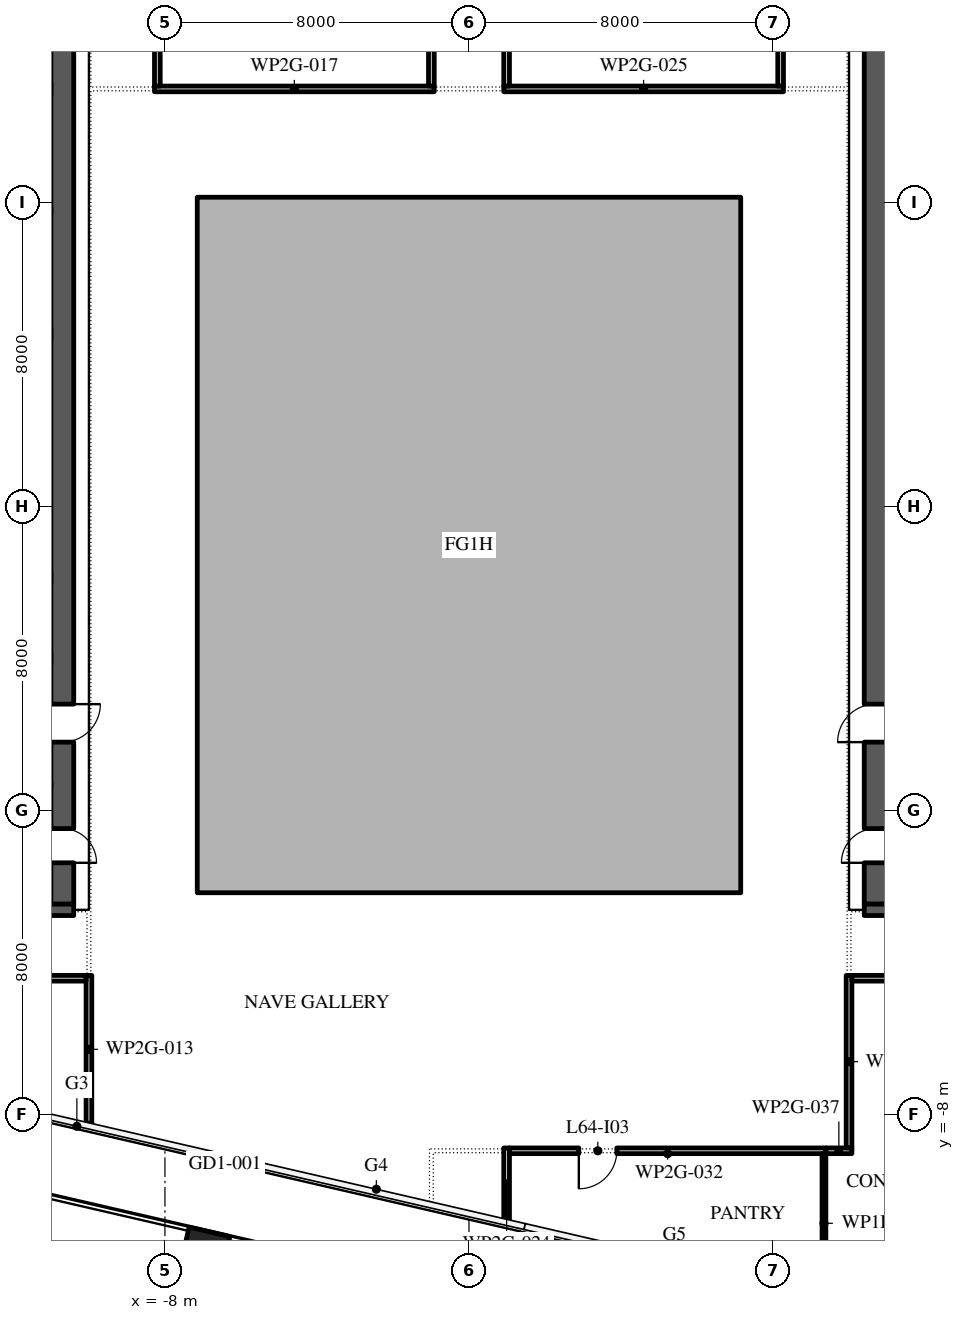
"""IFC4 building model, lengths in metres.
Left out: names, types, materials, properties, quantities, classifications, styles, units other than length and angle.
Written with IfcOpenShell. Run it as: python <this file> out.ifc"""

import sys

from ifc_helpers import new_model, si_unit, direction, frame, frame_2d, origin, origin_2d, place, context, subcontext, project, spatial, polyline, rectangle, outline, extrude, element, fill, save


model = new_model("IFC4")
c1 = context("Model", 3, precision=1e-05, world=origin(), true_north=direction((0.0, 1.0)))
c2 = subcontext(c1, "Body", "Model", "MODEL_VIEW")
j1 = project(units=[si_unit("LENGTHUNIT", "METRE"), si_unit("PLANEANGLEUNIT", "RADIAN")], contexts=[c1])
p1 = place(None, origin())
s1 = spatial("IfcSite", under=j1, at=p1, CompositionType="ELEMENT")
p2 = place(p1, origin())
s2 = spatial("IfcBuilding", under=s1, at=p2, CompositionType="ELEMENT")
p3 = place(p2, frame((0.0, 0.0, 293.4)))
s3 = spatial("IfcBuildingStorey", under=s2, at=p3, CompositionType="ELEMENT", Elevation=293.4)
p4 = place(p3, frame((-6.951, -11.608, 0.0), z_axis=(0.0, 0.0, 1.0), x_axis=(0.974370064785, -0.224951054344, 0.0)))
e1 = element("IfcColumn", 1, at=p4, inside=s3, PredefinedType="COLUMN", context=c2, shape_type="SweptSolid", body=[
    extrude(rectangle(XDim=1.1, YDim=1.1, at=origin_2d()), origin(), (0.0, 0.0, 1.0), 4.2),
])
p5 = place(p3, origin())
e2 = element("IfcWall", 2, at=p5, inside=s3, PredefinedType="STANDARD", context=c2, shape_type="SweptSolid", body=[
    extrude(outline(polyline([(-7.15, -2.15), (7.15, -2.15), (7.15, 16.15), (-7.15, 16.15), (-7.15, -2.15)]), holes=[polyline([(-7.0, -2.0), (-7.0, 16.0), (7.0, 16.0), (7.0, -2.0), (-7.0, -2.0)])]), origin(), (0.0, 0.0, 1.0), 3.75),
])
p6 = place(p3, frame((-10.7, -2.45, 0.0), z_axis=(0.0, 0.0, 1.0), x_axis=(0.0, 1.0, 0.0)))
e3 = element("IfcWall", 3, at=p6, inside=s3, PredefinedType="SHEAR", context=c2, shape_type="SweptSolid", body=[
    extrude(rectangle(XDim=27.9, YDim=0.6, at=frame_2d((13.95, 0.0))), origin(), (0.0, 0.0, 1.0), 3.75),
])
p7 = place(p6, frame((23.65, 0.0, 0.0)))
e4 = element("IfcOpeningElement", 4, at=p7, cuts=e3, PredefinedType="OPENING", context=c2, shape_type="SweptSolid", body=[
    extrude(rectangle(XDim=2.4, YDim=2.1, at=frame_2d((1.2, 1.05))), frame((0.0, 0.31, 0.0), z_axis=(0.0, -1.0, 0.0), x_axis=(1.0, 0.0, 0.0)), (0.0, 0.0, 1.0), 0.62),
])
p8 = place(p6, frame((1.087, 0.0, 0.0)))
e5 = element("IfcOpeningElement", 5, at=p8, cuts=e3, PredefinedType="OPENING", context=c2, shape_type="SweptSolid", body=[
    extrude(rectangle(XDim=0.9, YDim=2.1, at=frame_2d((0.45, 1.05))), frame((0.0, 0.31, 0.0), z_axis=(0.0, -1.0, 0.0), x_axis=(1.0, 0.0, 0.0)), (0.0, 0.0, 1.0), 0.62),
])
p9 = place(p6, frame((4.262, 0.0, 0.0)))
e6 = element("IfcOpeningElement", 6, at=p9, cuts=e3, PredefinedType="OPENING", context=c2, shape_type="SweptSolid", body=[
    extrude(rectangle(XDim=1.0, YDim=2.1, at=frame_2d((0.5, 1.05))), frame((0.0, 0.31, 0.0), z_axis=(0.0, -1.0, 0.0), x_axis=(1.0, 0.0, 0.0)), (0.0, 0.0, 1.0), 0.62),
])
p10 = place(p3, frame((-21.6, -2.6, 0.0), z_axis=(0.0, 0.0, 1.0), x_axis=(1.0, 0.0, 0.0)))
e7 = element("IfcWall", 7, at=p10, inside=s3, PredefinedType="SHEAR", context=c2, shape_type="SweptSolid", body=[
    extrude(rectangle(XDim=11.2, YDim=0.3, at=frame_2d((5.6, 0.0))), origin(), (0.0, 0.0, 1.0), 3.75),
])
p11 = place(p3, frame((10.7, -2.45, 0.0), z_axis=(0.0, 0.0, 1.0), x_axis=(0.0, 1.0, 0.0)))
e8 = element("IfcWall", 8, at=p11, inside=s3, PredefinedType="SHEAR", context=c2, shape_type="SweptSolid", body=[
    extrude(rectangle(XDim=27.9, YDim=0.6, at=frame_2d((13.95, 0.0))), origin(), (0.0, 0.0, 1.0), 3.75),
])
p12 = place(p11, frame((23.65, 0.0, 0.0)))
e9 = element("IfcOpeningElement", 9, at=p12, cuts=e8, PredefinedType="OPENING", context=c2, shape_type="SweptSolid", body=[
    extrude(rectangle(XDim=2.4, YDim=2.1, at=frame_2d((1.2, 1.05))), frame((0.0, 0.31, 0.0), z_axis=(0.0, -1.0, 0.0), x_axis=(1.0, 0.0, 0.0)), (0.0, 0.0, 1.0), 0.62),
])
p13 = place(p11, frame((1.087, 0.0, 0.0)))
e10 = element("IfcOpeningElement", 10, at=p13, cuts=e8, PredefinedType="OPENING", context=c2, shape_type="SweptSolid", body=[
    extrude(rectangle(XDim=0.9, YDim=2.1, at=frame_2d((0.45, 1.05))), frame((0.0, 0.31, 0.0), z_axis=(0.0, -1.0, 0.0), x_axis=(1.0, 0.0, 0.0)), (0.0, 0.0, 1.0), 0.62),
])
p14 = place(p11, frame((4.262, 0.0, 0.0)))
e11 = element("IfcOpeningElement", 11, at=p14, cuts=e8, PredefinedType="OPENING", context=c2, shape_type="SweptSolid", body=[
    extrude(rectangle(XDim=1.0, YDim=2.1, at=frame_2d((0.5, 1.05))), frame((0.0, 0.31, 0.0), z_axis=(0.0, -1.0, 0.0), x_axis=(1.0, 0.0, 0.0)), (0.0, 0.0, 1.0), 0.62),
])
p15 = place(p3, frame((10.4, -2.6, 0.0), z_axis=(0.0, 0.0, 1.0), x_axis=(1.0, 0.0, 0.0)))
e12 = element("IfcWall", 12, at=p15, inside=s3, PredefinedType="SHEAR", context=c2, shape_type="SweptSolid", body=[
    extrude(rectangle(XDim=11.2, YDim=0.3, at=frame_2d((5.6, 0.0))), origin(), (0.0, 0.0, 1.0), 3.75),
])
p16 = place(p3, frame((-10.0, -8.216, 0.0), z_axis=(0.0, 0.0, 1.0), x_axis=(0.0, 1.0, 0.0)))
e13 = element("IfcWall", 13, at=p16, inside=s3, PredefinedType="PARTITIONING", context=c2, shape_type="SweptSolid", body=[
    extrude(rectangle(XDim=3.891, YDim=0.15, at=frame_2d((1.946, 0.0))), origin(), (0.0, 0.0, 1.0), 3.75),
])
p17 = place(p3, frame((-10.075, -4.4, 0.0), z_axis=(0.0, 0.0, 1.0), x_axis=(-1.0, 0.0, 0.0)))
e14 = element("IfcWall", 14, at=p17, inside=s3, PredefinedType="PARTITIONING", context=c2, shape_type="SweptSolid", body=[
    extrude(rectangle(XDim=13.65, YDim=0.15, at=frame_2d((6.825, 0.0))), origin(), (0.0, 0.0, 1.0), 3.75),
])
p18 = place(p17, frame((9.075, 0.0, 0.0)))
e15 = element("IfcOpeningElement", 15, at=p18, cuts=e14, PredefinedType="OPENING", context=c2, shape_type="SweptSolid", body=[
    extrude(rectangle(XDim=1.0, YDim=2.1, at=frame_2d((0.5, 1.05))), frame((0.0, 0.085, 0.0), z_axis=(0.0, -1.0, 0.0), x_axis=(1.0, 0.0, 0.0)), (0.0, 0.0, 1.0), 0.17),
])
p19 = place(p3, frame((-8.275, 19.0, 0.0), z_axis=(0.0, 0.0, 1.0), x_axis=(1.0, 0.0, 0.0)))
e16 = element("IfcWall", 16, at=p19, inside=s3, PredefinedType="PARTITIONING", context=c2, shape_type="SweptSolid", body=[
    extrude(rectangle(XDim=7.36, YDim=0.15, at=frame_2d((3.68, 0.0))), origin(), (0.0, 0.0, 1.0), 3.75),
])
p20 = place(p3, frame((-8.2, 29.71, 0.0), z_axis=(0.0, 0.0, 1.0), x_axis=(0.0, -1.0, 0.0)))
e17 = element("IfcWall", 17, at=p20, inside=s3, PredefinedType="PARTITIONING", context=c2, shape_type="SweptSolid", body=[
    extrude(rectangle(XDim=10.635, YDim=0.15, at=frame_2d((5.317, 0.0))), origin(), (0.0, 0.0, 1.0), 3.75),
])
p21 = place(p20, frame((4.81, 0.0, 0.0)))
e18 = element("IfcOpeningElement", 18, at=p21, cuts=e17, PredefinedType="OPENING", context=c2, shape_type="SweptSolid", body=[
    extrude(rectangle(XDim=1.0, YDim=2.1, at=frame_2d((0.5, 1.05))), frame((0.0, 0.085, 0.0), z_axis=(0.0, -1.0, 0.0), x_axis=(1.0, 0.0, 0.0)), (0.0, 0.0, 1.0), 0.17),
])
p22 = place(p3, frame((-0.99, 19.075, 0.0), z_axis=(0.0, 0.0, 1.0), x_axis=(0.0, 1.0, 0.0)))
e19 = element("IfcWall", 19, at=p22, inside=s3, PredefinedType="PARTITIONING", context=c2, shape_type="SweptSolid", body=[
    extrude(rectangle(XDim=10.535, YDim=0.15, at=frame_2d((5.268, 0.0))), origin(), (0.0, 0.0, 1.0), 3.75),
])
p23 = place(p3, frame((0.99, -8.865, 0.0), z_axis=(0.0, 0.0, 1.0), x_axis=(0.0, -1.0, 0.0)))
e20 = element("IfcWall", 20, at=p23, inside=s3, PredefinedType="PARTITIONING", context=c2, shape_type="SweptSolid", body=[
    extrude(rectangle(XDim=1.888, YDim=0.15, at=frame_2d((0.944, 0.0))), origin(), (0.0, 0.0, 1.0), 3.75),
])
p24 = place(p3, frame((0.915, 19.0, 0.0), z_axis=(0.0, 0.0, 1.0), x_axis=(1.0, 0.0, 0.0)))
e21 = element("IfcWall", 21, at=p24, inside=s3, PredefinedType="PARTITIONING", context=c2, shape_type="SweptSolid", body=[
    extrude(rectangle(XDim=7.36, YDim=0.15, at=frame_2d((3.68, 0.0))), origin(), (0.0, 0.0, 1.0), 3.75),
])
p25 = place(p3, frame((0.99, 28.0, 0.0), z_axis=(0.0, 0.0, 1.0), x_axis=(0.0, -1.0, 0.0)))
e22 = element("IfcWall", 22, at=p25, inside=s3, PredefinedType="PARTITIONING", context=c2, shape_type="SweptSolid", body=[
    extrude(rectangle(XDim=8.925, YDim=0.15, at=frame_2d((4.462, 0.0))), origin(), (0.0, 0.0, 1.0), 3.75),
])
p26 = place(p3, frame((8.2, 19.075, 0.0), z_axis=(0.0, 0.0, 1.0), x_axis=(0.0, 1.0, 0.0)))
e23 = element("IfcWall", 23, at=p26, inside=s3, PredefinedType="PARTITIONING", context=c2, shape_type="SweptSolid", body=[
    extrude(rectangle(XDim=8.875, YDim=0.15, at=frame_2d((4.438, 0.0))), origin(), (0.0, 0.0, 1.0), 3.75),
])
p27 = place(p26, frame((4.025, 0.0, 0.0)))
e24 = element("IfcOpeningElement", 24, at=p27, cuts=e23, PredefinedType="OPENING", context=c2, shape_type="SweptSolid", body=[
    extrude(rectangle(XDim=1.0, YDim=2.1, at=frame_2d((0.5, 1.05))), frame((0.0, 0.085, 0.0), z_axis=(0.0, -1.0, 0.0), x_axis=(1.0, 0.0, 0.0)), (0.0, 0.0, 1.0), 0.17),
])
p28 = place(p3, frame((9.39, -8.94, 0.0), z_axis=(0.0, 0.0, 1.0), x_axis=(-1.0, 0.0, 0.0)))
e25 = element("IfcWall", 25, at=p28, inside=s3, PredefinedType="PARTITIONING", context=c2, shape_type="SweptSolid", body=[
    extrude(rectangle(XDim=8.325, YDim=0.15, at=frame_2d((4.163, 0.0))), origin(), (0.0, 0.0, 1.0), 3.75),
])
p29 = place(p28, frame((5.5, 0.0, 0.0)))
e26 = element("IfcOpeningElement", 26, at=p29, cuts=e25, PredefinedType="OPENING", context=c2, shape_type="SweptSolid", body=[
    extrude(rectangle(XDim=1.0, YDim=2.1, at=frame_2d((0.5, 1.05))), frame((0.0, 0.085, 0.0), z_axis=(0.0, -1.0, 0.0), x_axis=(1.0, 0.0, 0.0)), (0.0, 0.0, 1.0), 0.17),
])
p30 = place(p3, frame((9.34, -9.015, 0.0), z_axis=(0.0, 0.0, 1.0), x_axis=(0.0, -1.0, 0.0)))
e27 = element("IfcWall", 27, at=p30, inside=s3, PredefinedType="PARTITIONING", context=c2, shape_type="SweptSolid", body=[
    extrude(rectangle(XDim=3.666, YDim=0.1, at=frame_2d((1.833, 0.0))), origin(), (0.0, 0.0, 1.0), 3.75),
])
p31 = place(p3, frame((10.075, -8.94, 0.0), z_axis=(0.0, 0.0, 1.0), x_axis=(-1.0, 0.0, 0.0)))
e28 = element("IfcWall", 28, at=p31, inside=s3, PredefinedType="PARTITIONING", context=c2, shape_type="SweptSolid", body=[
    extrude(rectangle(XDim=0.685, YDim=0.15, at=frame_2d((0.343, 0.0))), origin(), (0.0, 0.0, 1.0), 3.75),
])
p32 = place(p3, frame((10.0, -4.325, 0.0), z_axis=(0.0, 0.0, 1.0), x_axis=(0.0, -1.0, 0.0)))
e29 = element("IfcWall", 29, at=p32, inside=s3, PredefinedType="PARTITIONING", context=c2, shape_type="SweptSolid", body=[
    extrude(rectangle(XDim=4.54, YDim=0.15, at=frame_2d((2.27, 0.0))), origin(), (0.0, 0.0, 1.0), 3.75),
])
p33 = place(p3, frame((22.968, -4.4, 0.0), z_axis=(0.0, 0.0, 1.0), x_axis=(-1.0, 0.0, 0.0)))
e30 = element("IfcWall", 30, at=p33, inside=s3, PredefinedType="PARTITIONING", context=c2, shape_type="SweptSolid", body=[
    extrude(rectangle(XDim=12.893, YDim=0.15, at=frame_2d((6.447, 0.0))), origin(), (0.0, 0.0, 1.0), 3.75),
])
p34 = place(p33, frame((4.568, 0.0, 0.0)))
e31 = element("IfcOpeningElement", 31, at=p34, cuts=e30, PredefinedType="OPENING", context=c2, shape_type="SweptSolid", body=[
    extrude(rectangle(XDim=1.0, YDim=2.1, at=frame_2d((0.5, 1.05))), frame((0.0, 0.085, 0.0), z_axis=(0.0, -1.0, 0.0), x_axis=(1.0, 0.0, 0.0)), (0.0, 0.0, 1.0), 0.17),
])
p35 = place(p29, origin())
e32 = element("IfcDoor", 32, at=p35, inside=s3, OperationType="SINGLE_SWING_LEFT", PredefinedType="DOOR", context=c2, shape_type="SweptSolid", body=[
    extrude(rectangle(XDim=1.0, YDim=2.1, at=frame_2d((0.5, 1.05))), frame((0.0, 0.025, 0.0), z_axis=(0.0, -1.0, 0.0), x_axis=(1.0, 0.0, 0.0)), (0.0, 0.0, 1.0), 0.05),
])
fill(e26, e32)
save(model, sys.argv[1])
